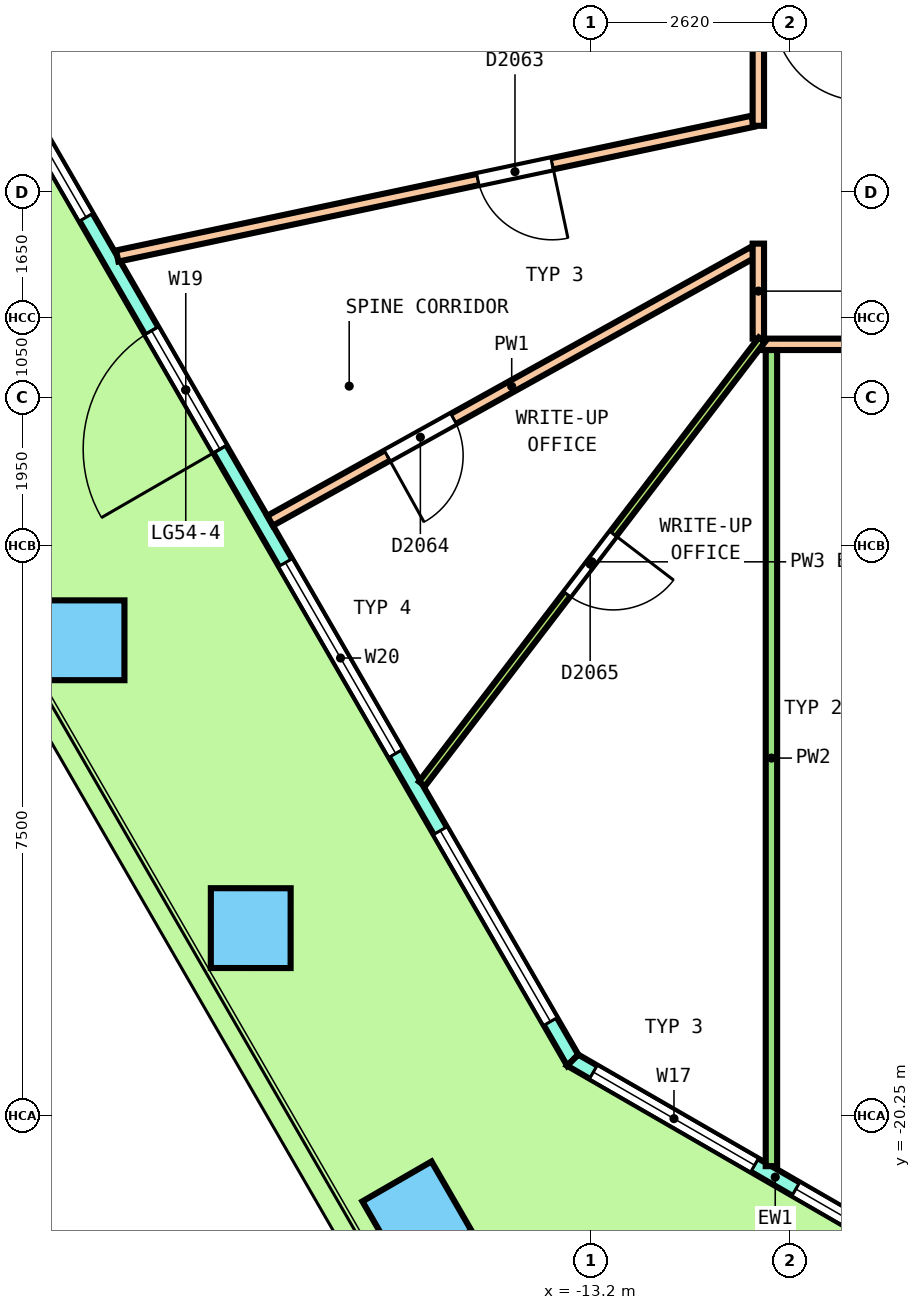
"""IFC4 building model, lengths in metres.
Left out: names, types, materials, properties, quantities, classifications, styles, units other than length and angle.
Written with IfcOpenShell. Run it as: python <this file> out.ifc"""

import sys

from ifc_helpers import new_model, si_unit, direction, frame, frame_2d, origin, origin_2d, place, context, subcontext, project, spatial, polyline, rectangle, outline, extrude, element, fill, save


model = new_model("IFC4")
c1 = context("Model", 3, precision=1e-05, world=origin(), true_north=direction((0.0, 1.0)))
c2 = subcontext(c1, "Body", "Model", "MODEL_VIEW")
j1 = project(units=[si_unit("LENGTHUNIT", "METRE"), si_unit("PLANEANGLEUNIT", "RADIAN")], contexts=[c1])
p1 = place(None, origin())
s1 = spatial("IfcSite", under=j1, at=p1, CompositionType="ELEMENT")
p2 = place(p1, origin())
s2 = spatial("IfcBuilding", under=s1, at=p2, CompositionType="ELEMENT")
p3 = place(p2, frame((0.0, 0.0, 249.4)))
s3 = spatial("IfcBuildingStorey", under=s2, at=p3, CompositionType="ELEMENT", Elevation=249.4)
p4 = place(p3, frame((-19.865, -13.993, 0.0), z_axis=(0.003611703602, -0.006287039604, 0.99997371402), x_axis=(0.497890396548, -0.867209652713, -0.007250604559)))
e1 = element("IfcColumn", 1, at=p4, inside=s3, PredefinedType="COLUMN", context=c2, shape_type="SweptSolid", body=[
    extrude(rectangle(XDim=1.05, YDim=1.05, at=origin_2d()), origin(), (0.0, 0.0, 1.0), 3.65),
])
p5 = place(p3, frame((-17.678, -17.781, 0.0), z_axis=(0.010929666371, -0.018841940186, 0.999762733694), x_axis=(0.5010622412, -0.865137072574, -0.021782472348)))
e2 = element("IfcColumn", 2, at=p5, inside=s3, PredefinedType="COLUMN", context=c2, shape_type="SweptSolid", body=[
    extrude(rectangle(XDim=1.05, YDim=1.05, at=origin_2d()), origin(), (0.0, 0.0, 1.0), 3.641),
])
p6 = place(p3, frame((-15.492, -21.567, 0.0), z_axis=(0.018096735828, -0.031434700382, 0.999341967379), x_axis=(0.865180582386, -0.500475750546, -0.031409918461)))
e3 = element("IfcColumn", 3, at=p6, inside=s3, PredefinedType="COLUMN", context=c2, shape_type="SweptSolid", body=[
    extrude(rectangle(XDim=1.05, YDim=1.05, at=origin_2d()), origin(), (0.0, 0.0, 1.0), 3.643),
])
p7 = place(p3, frame((-23.624, -1.882, 0.0), z_axis=(0.0, 0.0, 1.0), x_axis=(0.50000612033, -0.866021870181, 0.0)))
e4 = element("IfcWall", 4, at=p7, inside=s3, PredefinedType="SOLIDWALL", context=c2, shape_type="SweptSolid", body=[
    extrude(outline(polyline([(-0.027, -0.1), (0.994, -0.1), (2.015, -0.1), (3.036, -0.1), (4.057, -0.1), (5.077, -0.1), (6.098, -0.1), (7.119, -0.1), (8.14, -0.1), (9.161, -0.1), (10.182, -0.1), (11.203, -0.1), (12.223, -0.1), (13.244, -0.1), (14.265, -0.1), (15.286, -0.1), (16.307, -0.1), (17.328, -0.1), (18.349, -0.1), (19.37, -0.1), (20.39, -0.1), (20.337, 0.1), (19.321, 0.1), (18.306, 0.1), (17.29, 0.1), (16.275, 0.1), (15.259, 0.1), (14.244, 0.1), (13.228, 0.1), (12.213, 0.1), (11.197, 0.1), (10.182, 0.1), (9.166, 0.1), (8.151, 0.1), (7.135, 0.1), (6.12, 0.1), (5.104, 0.1), (4.089, 0.1), (3.073, 0.1), (2.058, 0.1), (1.042, 0.1), (0.027, 0.1), (-0.027, -0.1)])), origin(), (0.0, 0.0, 1.0), 3.7),
])
p8 = place(p7, frame((0.586, 0.0, 0.1)))
e5 = element("IfcOpeningElement", 5, at=p8, cuts=e4, PredefinedType="OPENING", context=c2, shape_type="SweptSolid", body=[
    extrude(rectangle(XDim=2.9, YDim=2.65, at=frame_2d((1.45, 1.325))), frame((0.0, 0.11, 0.0), z_axis=(0.0, -1.0, 0.0), x_axis=(1.0, 0.0, 0.0)), (0.0, 0.0, 1.0), 0.22),
])
p9 = place(p7, frame((4.659, 0.0, 0.1)))
e6 = element("IfcOpeningElement", 6, at=p9, cuts=e4, PredefinedType="OPENING", context=c2, shape_type="SweptSolid", body=[
    extrude(rectangle(XDim=2.9, YDim=2.65, at=frame_2d((1.45, 1.325))), frame((0.0, 0.11, 0.0), z_axis=(0.0, -1.0, 0.0), x_axis=(1.0, 0.0, 0.0)), (0.0, 0.0, 1.0), 0.22),
])
p10 = place(p7, frame((9.282, 0.0, 0.0)))
e7 = element("IfcOpeningElement", 7, at=p10, cuts=e4, PredefinedType="OPENING", context=c2, shape_type="SweptSolid", body=[
    extrude(rectangle(XDim=1.8, YDim=2.4, at=frame_2d((0.9, 1.2))), frame((0.0, 0.11, 0.0), z_axis=(0.0, -1.0, 0.0), x_axis=(1.0, 0.0, 0.0)), (0.0, 0.0, 1.0), 0.22),
])
p11 = place(p7, frame((9.282, 0.0, 2.55)))
e8 = element("IfcOpeningElement", 8, at=p11, cuts=e4, PredefinedType="OPENING", context=c2, shape_type="SweptSolid", body=[
    extrude(rectangle(XDim=1.8, YDim=0.2, at=frame_2d((0.9, 0.1))), frame((0.0, 0.11, 0.0), z_axis=(0.0, -1.0, 0.0), x_axis=(1.0, 0.0, 0.0)), (0.0, 0.0, 1.0), 0.22),
])
p12 = place(p7, frame((12.805, 0.0, 0.1)))
e9 = element("IfcOpeningElement", 9, at=p12, cuts=e4, PredefinedType="OPENING", context=c2, shape_type="SweptSolid", body=[
    extrude(rectangle(XDim=2.9, YDim=2.65, at=frame_2d((1.45, 1.325))), frame((0.0, 0.11, 0.0), z_axis=(0.0, -1.0, 0.0), x_axis=(1.0, 0.0, 0.0)), (0.0, 0.0, 1.0), 0.22),
])
p13 = place(p7, frame((16.877, 0.0, 0.1)))
e10 = element("IfcOpeningElement", 10, at=p13, cuts=e4, PredefinedType="OPENING", context=c2, shape_type="SweptSolid", body=[
    extrude(rectangle(XDim=2.9, YDim=2.65, at=frame_2d((1.45, 1.325))), frame((0.0, 0.11, 0.0), z_axis=(0.0, -1.0, 0.0), x_axis=(1.0, 0.0, 0.0)), (0.0, 0.0, 1.0), 0.22),
])
p14 = place(p3, frame((-13.442, -19.518, 0.0), z_axis=(0.0, 0.0, 1.0), x_axis=(0.866012465712, -0.500022408728, 0.0)))
e11 = element("IfcWall", 11, at=p14, inside=s3, PredefinedType="SOLIDWALL", context=c2, shape_type="SweptSolid", body=[
    extrude(outline(polyline([(-0.027, -0.1), (1.008, -0.1), (2.042, -0.1), (3.077, -0.1), (4.111, -0.1), (5.146, -0.1), (6.18, -0.1), (6.126, 0.1), (5.11, 0.1), (4.093, 0.1), (3.077, 0.1), (2.06, 0.1), (1.043, 0.1), (0.027, 0.1), (-0.027, -0.1)])), origin(), (0.0, 0.0, 1.0), 3.7),
])
p15 = place(p14, frame((0.313, 0.0, 0.1)))
e12 = element("IfcOpeningElement", 12, at=p15, cuts=e11, PredefinedType="OPENING", context=c2, shape_type="SweptSolid", body=[
    extrude(rectangle(XDim=2.45, YDim=2.65, at=frame_2d((1.225, 1.325))), frame((0.0, 0.11, 0.0), z_axis=(0.0, -1.0, 0.0), x_axis=(1.0, 0.0, 0.0)), (0.0, 0.0, 1.0), 0.22),
])
p16 = place(p14, frame((3.39, 0.0, 0.1)))
e13 = element("IfcOpeningElement", 13, at=p16, cuts=e11, PredefinedType="OPENING", context=c2, shape_type="SweptSolid", body=[
    extrude(rectangle(XDim=2.45, YDim=2.65, at=frame_2d((1.225, 1.325))), frame((0.0, 0.11, 0.0), z_axis=(0.0, -1.0, 0.0), x_axis=(1.0, 0.0, 0.0)), (0.0, 0.0, 1.0), 0.22),
])
p17 = place(p3, frame((-19.435, -8.938, 0.0), z_axis=(0.0, 0.0, 1.0), x_axis=(0.978255730957, 0.207402326048, 0.0)))
e14 = element("IfcWall", 14, at=p17, inside=s3, PredefinedType="PARTITIONING", context=c2, shape_type="SweptSolid", body=[
    extrude(rectangle(XDim=8.547, YDim=0.15, at=frame_2d((4.273, 0.0))), origin(), (0.0, 0.0, 1.0), 2.8),
])
p18 = place(p17, frame((4.849, 0.0, 0.0)))
e15 = element("IfcOpeningElement", 15, at=p18, cuts=e14, PredefinedType="OPENING", context=c2, shape_type="SweptSolid", body=[
    extrude(rectangle(XDim=1.0, YDim=2.1, at=frame_2d((0.5, 1.05))), frame((0.0, 0.085, 0.0), z_axis=(0.0, -1.0, 0.0), x_axis=(1.0, 0.0, 0.0)), (0.0, 0.0, 1.0), 0.17),
])
p19 = place(p3, frame((-17.424, -12.421, 0.0), z_axis=(0.0, 0.0, 1.0), x_axis=(0.874033768058, 0.485865179134, 0.0)))
e16 = element("IfcWall", 16, at=p19, inside=s3, PredefinedType="PARTITIONING", context=c2, shape_type="SweptSolid", body=[
    extrude(rectangle(XDim=7.274, YDim=0.15, at=frame_2d((3.637, 0.0))), origin(), (0.0, 0.0, 1.0), 2.8),
])
p20 = place(p19, frame((1.762, 0.0, 0.0)))
e17 = element("IfcOpeningElement", 17, at=p20, cuts=e16, PredefinedType="OPENING", context=c2, shape_type="SweptSolid", body=[
    extrude(rectangle(XDim=1.0, YDim=2.1, at=frame_2d((0.5, 1.05))), frame((0.0, 0.085, 0.0), z_axis=(0.0, -1.0, 0.0), x_axis=(1.0, 0.0, 0.0)), (0.0, 0.0, 1.0), 0.17),
])
p21 = place(p3, frame((-11.0, -10.025, 0.0), z_axis=(0.0, 0.0, 1.0), x_axis=(0.0, 1.0, 0.0)))
e18 = element("IfcWall", 18, at=p21, inside=s3, PredefinedType="PARTITIONING", context=c2, shape_type="SweptSolid", body=[
    extrude(rectangle(XDim=1.25, YDim=0.15, at=frame_2d((0.625, 0.0))), origin(), (0.0, 0.0, 1.0), 3.7),
])
p22 = place(p3, frame((-11.0, -7.225, 0.0), z_axis=(0.0, 0.0, 1.0), x_axis=(0.0, 1.0, 0.0)))
e19 = element("IfcWall", 19, at=p22, inside=s3, PredefinedType="PARTITIONING", context=c2, shape_type="SweptSolid", body=[
    extrude(rectangle(XDim=17.275, YDim=0.15, at=frame_2d((8.638, 0.0))), origin(), (0.0, 0.0, 1.0), 2.8),
])
p23 = place(p22, frame((15.654, 0.0, 0.0)))
e20 = element("IfcOpeningElement", 20, at=p23, cuts=e19, PredefinedType="OPENING", context=c2, shape_type="SweptSolid", body=[
    extrude(rectangle(XDim=1.0, YDim=2.1, at=frame_2d((0.5, 1.05))), frame((0.0, 0.085, 0.0), z_axis=(0.0, -1.0, 0.0), x_axis=(1.0, 0.0, 0.0)), (0.0, 0.0, 1.0), 0.17),
])
p24 = place(p22, frame((12.264, 0.0, 0.0)))
e21 = element("IfcOpeningElement", 21, at=p24, cuts=e19, PredefinedType="OPENING", context=c2, shape_type="SweptSolid", body=[
    extrude(rectangle(XDim=1.0, YDim=2.1, at=frame_2d((0.5, 1.05))), frame((0.0, 0.085, 0.0), z_axis=(0.0, -1.0, 0.0), x_axis=(1.0, 0.0, 0.0)), (0.0, 0.0, 1.0), 0.17),
])
p25 = place(p22, frame((9.822, 0.0, 0.0)))
e22 = element("IfcOpeningElement", 22, at=p25, cuts=e19, PredefinedType="OPENING", context=c2, shape_type="SweptSolid", body=[
    extrude(rectangle(XDim=1.0, YDim=2.1, at=frame_2d((0.5, 1.05))), frame((0.0, 0.085, 0.0), z_axis=(0.0, -1.0, 0.0), x_axis=(1.0, 0.0, 0.0)), (0.0, 0.0, 1.0), 0.17),
])
p26 = place(p22, frame((6.157, 0.0, 0.0)))
e23 = element("IfcOpeningElement", 23, at=p26, cuts=e19, PredefinedType="OPENING", context=c2, shape_type="SweptSolid", body=[
    extrude(rectangle(XDim=1.0, YDim=2.1, at=frame_2d((0.5, 1.05))), frame((0.0, 0.085, 0.0), z_axis=(0.0, -1.0, 0.0), x_axis=(1.0, 0.0, 0.0)), (0.0, 0.0, 1.0), 0.17),
])
p27 = place(p3, frame((-10.95, -10.1, 0.0), z_axis=(0.0, 0.0, 1.0), x_axis=(1.0, 0.0, 0.0)))
e24 = element("IfcWall", 24, at=p27, inside=s3, PredefinedType="PARTITIONING", context=c2, shape_type="SweptSolid", body=[
    extrude(rectangle(XDim=21.875, YDim=0.15, at=frame_2d((10.938, 0.0))), origin(), (0.0, 0.0, 1.0), 2.8),
])
p28 = place(p27, frame((3.027, 0.0, 0.0)))
e25 = element("IfcOpeningElement", 25, at=p28, cuts=e24, PredefinedType="OPENING", context=c2, shape_type="SweptSolid", body=[
    extrude(rectangle(XDim=1.2, YDim=2.1, at=frame_2d((0.6, 1.05))), frame((0.0, 0.085, 0.0), z_axis=(0.0, -1.0, 0.0), x_axis=(1.0, 0.0, 0.0)), (0.0, 0.0, 1.0), 0.17),
])
p29 = place(p27, frame((14.786, 0.0, 0.0)))
e26 = element("IfcOpeningElement", 26, at=p29, cuts=e24, PredefinedType="OPENING", context=c2, shape_type="SweptSolid", body=[
    extrude(rectangle(XDim=1.2, YDim=2.1, at=frame_2d((0.6, 1.05))), frame((0.0, 0.085, 0.0), z_axis=(0.0, -1.0, 0.0), x_axis=(1.0, 0.0, 0.0)), (0.0, 0.0, 1.0), 0.17),
])
p30 = place(p27, frame((20.194, 0.0, 0.0)))
e27 = element("IfcOpeningElement", 27, at=p30, cuts=e24, PredefinedType="OPENING", context=c2, shape_type="SweptSolid", body=[
    extrude(rectangle(XDim=1.0, YDim=2.1, at=frame_2d((0.5, 1.05))), frame((0.0, 0.085, 0.0), z_axis=(0.0, -1.0, 0.0), x_axis=(1.0, 0.0, 0.0)), (0.0, 0.0, 1.0), 0.17),
])
p31 = place(p3, frame((-10.828, -20.912, 0.0), z_axis=(0.0, 0.0, 1.0), x_axis=(0.0, 1.0, 0.0)))
e28 = element("IfcWall", 28, at=p31, inside=s3, PredefinedType="PARTITIONING", context=c2, shape_type="SweptSolid", body=[
    extrude(rectangle(XDim=10.737, YDim=0.15, at=frame_2d((5.368, 0.0))), origin(), (0.0, 0.0, 1.0), 2.8),
])
p32 = place(p3, frame((-15.425, -15.883, 0.0), z_axis=(0.0, 0.0, 1.0), x_axis=(0.607734612905, 0.79414018931, 0.0)))
e29 = element("IfcWall", 29, at=p32, inside=s3, PredefinedType="PARTITIONING", context=c2, shape_type="SweptSolid", body=[
    extrude(rectangle(XDim=7.357, YDim=0.1, at=frame_2d((3.678, 0.0))), origin(), (0.0, 0.0, 1.0), 2.8),
])
p33 = place(p32, frame((3.141, 0.0, 0.0)))
e30 = element("IfcOpeningElement", 30, at=p33, cuts=e29, PredefinedType="OPENING", context=c2, shape_type="SweptSolid", body=[
    extrude(rectangle(XDim=1.0, YDim=2.1, at=frame_2d((0.5, 1.05))), frame((0.0, 0.06, 0.0), z_axis=(0.0, -1.0, 0.0), x_axis=(1.0, 0.0, 0.0)), (0.0, 0.0, 1.0), 0.12),
])
p34 = place(p9, origin())
e31 = element("IfcWindow", 31, at=p34, inside=s3, PartitioningType="SINGLE_PANEL", PredefinedType="WINDOW", context=c2, shape_type="SweptSolid", body=[
    extrude(rectangle(XDim=2.9, YDim=2.65, at=frame_2d((1.45, 1.325))), frame((0.0, 0.03, 0.0), z_axis=(0.0, -1.0, 0.0), x_axis=(1.0, 0.0, 0.0)), (0.0, 0.0, 1.0), 0.06),
])
fill(e6, e31)
p35 = place(p10, origin())
e32 = element("IfcDoor", 32, at=p35, inside=s3, OperationType="DOUBLE_DOOR_SINGLE_SWING", PredefinedType="DOOR", context=c2, shape_type="SweptSolid", body=[
    extrude(rectangle(XDim=1.8, YDim=2.4, at=frame_2d((0.9, 1.2))), frame((0.0, 0.025, 0.0), z_axis=(0.0, -1.0, 0.0), x_axis=(1.0, 0.0, 0.0)), (0.0, 0.0, 1.0), 0.05),
])
fill(e7, e32)
p36 = place(p11, origin())
e33 = element("IfcWindow", 33, at=p36, inside=s3, PartitioningType="SINGLE_PANEL", PredefinedType="WINDOW", context=c2, shape_type="SweptSolid", body=[
    extrude(rectangle(XDim=1.8, YDim=0.2, at=frame_2d((0.9, 0.1))), frame((0.0, 0.03, 0.0), z_axis=(0.0, -1.0, 0.0), x_axis=(1.0, 0.0, 0.0)), (0.0, 0.0, 1.0), 0.06),
])
fill(e8, e33)
p37 = place(p12, origin())
e34 = element("IfcWindow", 34, at=p37, inside=s3, PartitioningType="SINGLE_PANEL", PredefinedType="WINDOW", context=c2, shape_type="SweptSolid", body=[
    extrude(rectangle(XDim=2.9, YDim=2.65, at=frame_2d((1.45, 1.325))), frame((0.0, 0.03, 0.0), z_axis=(0.0, -1.0, 0.0), x_axis=(1.0, 0.0, 0.0)), (0.0, 0.0, 1.0), 0.06),
])
fill(e9, e34)
p38 = place(p13, origin())
e35 = element("IfcWindow", 35, at=p38, inside=s3, PartitioningType="SINGLE_PANEL", PredefinedType="WINDOW", context=c2, shape_type="SweptSolid", body=[
    extrude(rectangle(XDim=2.9, YDim=2.65, at=frame_2d((1.45, 1.325))), frame((0.0, 0.03, 0.0), z_axis=(0.0, -1.0, 0.0), x_axis=(1.0, 0.0, 0.0)), (0.0, 0.0, 1.0), 0.06),
])
fill(e10, e35)
p39 = place(p15, origin())
e36 = element("IfcWindow", 36, at=p39, inside=s3, PartitioningType="SINGLE_PANEL", PredefinedType="WINDOW", context=c2, shape_type="SweptSolid", body=[
    extrude(rectangle(XDim=2.45, YDim=2.65, at=frame_2d((1.225, 1.325))), frame((0.0, 0.03, 0.0), z_axis=(0.0, -1.0, 0.0), x_axis=(1.0, 0.0, 0.0)), (0.0, 0.0, 1.0), 0.06),
])
fill(e12, e36)
p40 = place(p16, origin())
e37 = element("IfcWindow", 37, at=p40, inside=s3, PartitioningType="SINGLE_PANEL", PredefinedType="WINDOW", context=c2, shape_type="SweptSolid", body=[
    extrude(rectangle(XDim=2.45, YDim=2.65, at=frame_2d((1.225, 1.325))), frame((0.0, 0.03, 0.0), z_axis=(0.0, -1.0, 0.0), x_axis=(1.0, 0.0, 0.0)), (0.0, 0.0, 1.0), 0.06),
])
fill(e13, e37)
p41 = place(p18, origin())
e38 = element("IfcDoor", 38, at=p41, inside=s3, OperationType="SINGLE_SWING_RIGHT", PredefinedType="DOOR", context=c2, shape_type="SweptSolid", body=[
    extrude(rectangle(XDim=1.0, YDim=2.1, at=frame_2d((0.5, 1.05))), frame((0.0, 0.025, 0.0), z_axis=(0.0, -1.0, 0.0), x_axis=(1.0, 0.0, 0.0)), (0.0, 0.0, 1.0), 0.05),
])
fill(e15, e38)
p42 = place(p20, origin())
e39 = element("IfcDoor", 39, at=p42, inside=s3, OperationType="SINGLE_SWING_LEFT", PredefinedType="DOOR", context=c2, shape_type="SweptSolid", body=[
    extrude(rectangle(XDim=1.0, YDim=2.1, at=frame_2d((0.5, 1.05))), frame((0.0, 0.025, 0.0), z_axis=(0.0, -1.0, 0.0), x_axis=(1.0, 0.0, 0.0)), (0.0, 0.0, 1.0), 0.05),
])
fill(e17, e39)
p43 = place(p33, origin())
e40 = element("IfcDoor", 40, at=p43, inside=s3, OperationType="SINGLE_SWING_RIGHT", PredefinedType="DOOR", context=c2, shape_type="SweptSolid", body=[
    extrude(rectangle(XDim=1.0, YDim=2.1, at=frame_2d((0.5, 1.05))), frame((0.0, 0.025, 0.0), z_axis=(0.0, -1.0, 0.0), x_axis=(1.0, 0.0, 0.0)), (0.0, 0.0, 1.0), 0.05),
])
fill(e30, e40)
save(model, sys.argv[1])
